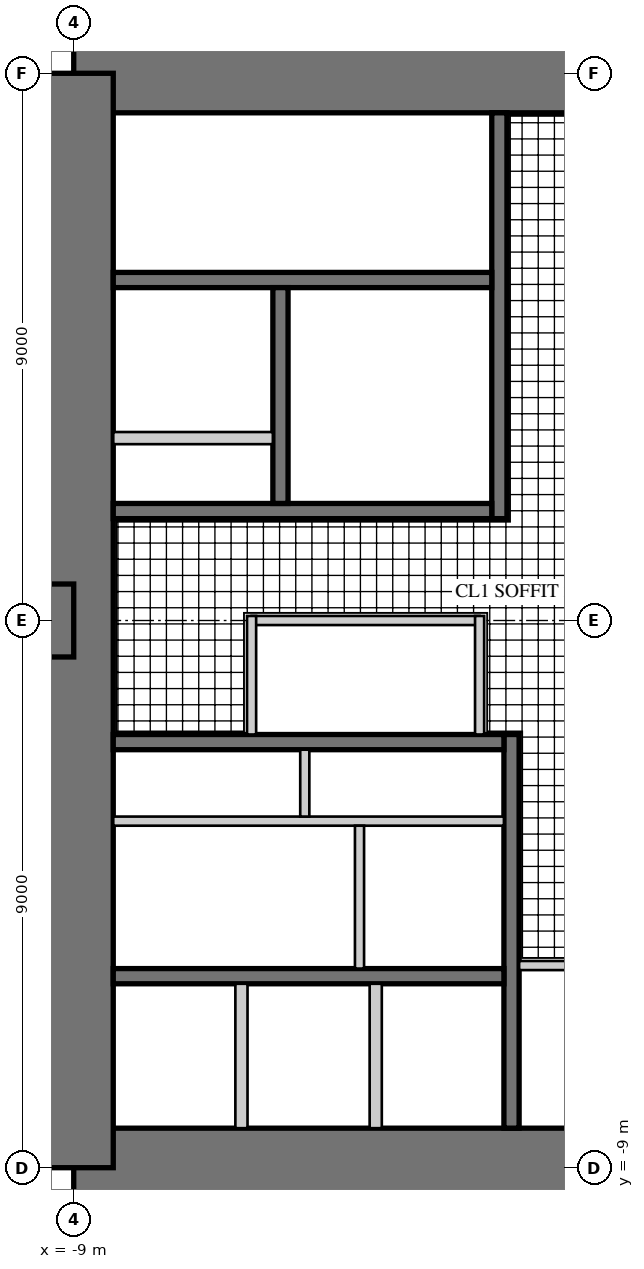
"""IFC4 building model, lengths in metres.
Left out: names, types, materials, properties, quantities, classifications, styles, units other than length and angle.
Written with IfcOpenShell. Run it as: python <this file> out.ifc"""

import sys

from ifc_helpers import new_model, si_unit, direction, frame, frame_2d, origin, place, context, subcontext, project, spatial, rectangle, extrude, element, fill, save


model = new_model("IFC4")
c1 = context("Model", 3, precision=1e-05, world=origin(), true_north=direction((0.0, 1.0)))
c2 = subcontext(c1, "Body", "Model", "MODEL_VIEW")
j1 = project(units=[si_unit("LENGTHUNIT", "METRE"), si_unit("PLANEANGLEUNIT", "RADIAN")], contexts=[c1])
p1 = place(None, origin())
s1 = spatial("IfcSite", under=j1, at=p1, CompositionType="ELEMENT")
p2 = place(p1, origin())
s2 = spatial("IfcBuilding", under=s1, at=p2, CompositionType="ELEMENT")
p3 = place(p2, frame((0.0, 0.0, 104.5)))
s3 = spatial("IfcBuildingStorey", under=s2, at=p3, CompositionType="ELEMENT", Elevation=104.5)
p4 = place(p3, frame((9.0, 9.0, 0.0), z_axis=(0.0, 0.0, 1.0), x_axis=(-1.0, 0.0, 0.0)))
e1 = element("IfcWall", 1, at=p4, inside=s3, PredefinedType="SHEAR", context=c2, shape_type="SweptSolid", body=[
    extrude(rectangle(XDim=18.0, YDim=1.3, at=frame_2d((9.0, 0.0))), origin(), (0.0, 0.0, 1.0), 4.0),
])
p5 = place(p4, frame((9.8, 0.0, 0.0)))
e2 = element("IfcOpeningElement", 2, at=p5, cuts=e1, PredefinedType="OPENING", context=c2, shape_type="SweptSolid", body=[
    extrude(rectangle(XDim=1.0, YDim=2.4, at=frame_2d((0.5, 1.2))), frame((0.0, 0.66, 0.0), z_axis=(0.0, -1.0, 0.0), x_axis=(1.0, 0.0, 0.0)), (0.0, 0.0, 1.0), 1.32),
])
p6 = place(p3, frame((-9.0, -9.0, 0.0), z_axis=(0.0, 0.0, 1.0), x_axis=(1.0, 0.0, 0.0)))
e3 = element("IfcWall", 3, at=p6, inside=s3, PredefinedType="SHEAR", context=c2, shape_type="SweptSolid", body=[
    extrude(rectangle(XDim=18.0, YDim=1.3, at=frame_2d((9.0, 0.0))), origin(), (0.0, 0.0, 1.0), 4.0),
])
p7 = place(p6, frame((9.8, 0.0, 0.0)))
e4 = element("IfcOpeningElement", 4, at=p7, cuts=e3, PredefinedType="OPENING", context=c2, shape_type="SweptSolid", body=[
    extrude(rectangle(XDim=1.0, YDim=2.4, at=frame_2d((0.5, 1.2))), frame((0.0, 0.66, 0.0), z_axis=(0.0, -1.0, 0.0), x_axis=(1.0, 0.0, 0.0)), (0.0, 0.0, 1.0), 1.32),
])
p8 = place(p3, frame((-9.0, 9.0, 0.0), z_axis=(0.0, 0.0, 1.0), x_axis=(0.0, -1.0, 0.0)))
e5 = element("IfcWall", 5, at=p8, inside=s3, PredefinedType="SHEAR", context=c2, shape_type="SweptSolid", body=[
    extrude(rectangle(XDim=18.0, YDim=1.3, at=frame_2d((9.0, 0.0))), origin(), (0.0, 0.0, 1.0), 4.0),
])
p9 = place(p8, frame((9.8, 0.0, 0.0)))
e6 = element("IfcOpeningElement", 6, at=p9, cuts=e5, PredefinedType="OPENING", context=c2, shape_type="SweptSolid", body=[
    extrude(rectangle(XDim=1.0, YDim=2.4, at=frame_2d((0.5, 1.2))), frame((0.0, 0.66, 0.0), z_axis=(0.0, -1.0, 0.0), x_axis=(1.0, 0.0, 0.0)), (0.0, 0.0, 1.0), 1.32),
])
p10 = place(p3, frame((-2.0, 1.675, 0.0), z_axis=(0.0, 0.0, 1.0), x_axis=(0.0, 1.0, 0.0)))
e7 = element("IfcWall", 7, at=p10, inside=s3, PredefinedType="SHEAR", context=c2, shape_type="SweptSolid", body=[
    extrude(rectangle(XDim=6.675, YDim=0.25, at=frame_2d((3.337, 0.0))), origin(), (0.0, 0.0, 1.0), 4.0),
])
p11 = place(p10, frame((0.725, 0.0, 0.0)))
e8 = element("IfcOpeningElement", 8, at=p11, cuts=e7, PredefinedType="OPENING", context=c2, shape_type="SweptSolid", body=[
    extrude(rectangle(XDim=1.0, YDim=2.1, at=frame_2d((0.5, 1.05))), frame((0.0, 0.135, 0.0), z_axis=(0.0, -1.0, 0.0), x_axis=(1.0, 0.0, 0.0)), (0.0, 0.0, 1.0), 0.27),
])
p12 = place(p3, frame((-2.125, 1.8, 0.0), z_axis=(0.0, 0.0, 1.0), x_axis=(-1.0, 0.0, 0.0)))
e9 = element("IfcWall", 9, at=p12, inside=s3, PredefinedType="SHEAR", context=c2, shape_type="SweptSolid", body=[
    extrude(rectangle(XDim=6.225, YDim=0.25, at=frame_2d((3.113, 0.0))), origin(), (0.0, 0.0, 1.0), 4.0),
])
p13 = place(p3, frame((-2.125, 5.6, 0.0), z_axis=(0.0, 0.0, 1.0), x_axis=(-1.0, 0.0, 0.0)))
e10 = element("IfcWall", 10, at=p13, inside=s3, PredefinedType="SHEAR", context=c2, shape_type="SweptSolid", body=[
    extrude(rectangle(XDim=6.225, YDim=0.25, at=frame_2d((3.113, 0.0))), origin(), (0.0, 0.0, 1.0), 4.0),
])
p14 = place(p13, frame((0.175, 0.0, 0.0)))
e11 = element("IfcOpeningElement", 11, at=p14, cuts=e10, PredefinedType="OPENING", context=c2, shape_type="SweptSolid", body=[
    extrude(rectangle(XDim=1.0, YDim=2.1, at=frame_2d((0.5, 1.05))), frame((0.0, 0.135, 0.0), z_axis=(0.0, -1.0, 0.0), x_axis=(1.0, 0.0, 0.0)), (0.0, 0.0, 1.0), 0.27),
])
p15 = place(p3, frame((-5.6, 1.925, 0.0), z_axis=(0.0, 0.0, 1.0), x_axis=(0.0, 1.0, 0.0)))
e12 = element("IfcWall", 12, at=p15, inside=s3, PredefinedType="SHEAR", context=c2, shape_type="SweptSolid", body=[
    extrude(rectangle(XDim=3.55, YDim=0.25, at=frame_2d((1.775, 0.0))), origin(), (0.0, 0.0, 1.0), 4.0),
])
p16 = place(p15, frame((1.525, 0.0, 0.0)))
e13 = element("IfcOpeningElement", 13, at=p16, cuts=e12, PredefinedType="OPENING", context=c2, shape_type="SweptSolid", body=[
    extrude(rectangle(XDim=1.1, YDim=2.2, at=frame_2d((0.55, 1.1))), frame((0.0, 0.135, 0.0), z_axis=(0.0, -1.0, 0.0), x_axis=(1.0, 0.0, 0.0)), (0.0, 0.0, 1.0), 0.27),
])
p17 = place(p15, frame((0.075, 0.0, 0.0)))
e14 = element("IfcOpeningElement", 14, at=p17, cuts=e12, PredefinedType="OPENING", context=c2, shape_type="SweptSolid", body=[
    extrude(rectangle(XDim=0.8, YDim=2.1, at=frame_2d((0.4, 1.05))), frame((0.0, 0.135, 0.0), z_axis=(0.0, -1.0, 0.0), x_axis=(1.0, 0.0, 0.0)), (0.0, 0.0, 1.0), 0.27),
])
p18 = place(p3, frame((-5.725, 3.0, 0.0), z_axis=(0.0, 0.0, 1.0), x_axis=(-1.0, 0.0, 0.0)))
e15 = element("IfcWall", 15, at=p18, inside=s3, PredefinedType="PARTITIONING", context=c2, shape_type="SweptSolid", body=[
    extrude(rectangle(XDim=2.625, YDim=0.2, at=frame_2d((1.312, 0.0))), origin(), (0.0, 0.0, 1.0), 4.0),
])
p19 = place(p3, frame((-1.8, -1.875, 0.0), z_axis=(0.0, 0.0, 1.0), x_axis=(0.0, -1.0, 0.0)))
e16 = element("IfcWall", 16, at=p19, inside=s3, PredefinedType="SHEAR", context=c2, shape_type="SweptSolid", body=[
    extrude(rectangle(XDim=6.475, YDim=0.25, at=frame_2d((3.238, 0.0))), origin(), (0.0, 0.0, 1.0), 4.0),
])
p20 = place(p19, frame((1.875, 0.0, 0.0)))
e17 = element("IfcOpeningElement", 17, at=p20, cuts=e16, PredefinedType="OPENING", context=c2, shape_type="SweptSolid", body=[
    extrude(rectangle(XDim=1.6, YDim=2.4, at=frame_2d((0.8, 1.2))), frame((0.0, 0.135, 0.0), z_axis=(0.0, -1.0, 0.0), x_axis=(1.0, 0.0, 0.0)), (0.0, 0.0, 1.0), 0.27),
])
for number, where, z_axis, x_axis in (
    (18, (-1.925, -2.0, 0.0), (0.0, 0.0, 1.0), (-1.0, 0.0, 0.0)),
    (19, (-1.925, -5.85, 0.0), (0.0, 0.0, 1.0), (-1.0, 0.0, 0.0)),
):
    element("IfcWall", number, at=place(p3, frame(where, z_axis=z_axis, x_axis=x_axis)), inside=s3, PredefinedType="SHEAR", context=c2, shape_type="SweptSolid", body=[
        extrude(rectangle(XDim=6.425, YDim=0.25, at=frame_2d((3.212, 0.0))), origin(), (0.0, 0.0, 1.0), 4.0),
    ])
p21 = place(p3, frame((-1.925, -3.3, 0.0), z_axis=(0.0, 0.0, 1.0), x_axis=(-1.0, 0.0, 0.0)))
e20 = element("IfcWall", 20, at=p21, inside=s3, PredefinedType="PARTITIONING", context=c2, shape_type="SweptSolid", body=[
    extrude(rectangle(XDim=6.425, YDim=0.15, at=frame_2d((3.212, 0.0))), origin(), (0.0, 0.0, 1.0), 4.0),
])
p22 = place(p21, frame((0.075, 0.0, 0.0)))
e21 = element("IfcOpeningElement", 21, at=p22, cuts=e20, PredefinedType="OPENING", context=c2, shape_type="SweptSolid", body=[
    extrude(rectangle(XDim=0.8, YDim=2.1, at=frame_2d((0.4, 1.05))), frame((0.0, 0.085, 0.0), z_axis=(0.0, -1.0, 0.0), x_axis=(1.0, 0.0, 0.0)), (0.0, 0.0, 1.0), 0.17),
])
p23 = place(p21, frame((3.675, 0.0, 0.0)))
e22 = element("IfcOpeningElement", 22, at=p23, cuts=e20, PredefinedType="OPENING", context=c2, shape_type="SweptSolid", body=[
    extrude(rectangle(XDim=0.8, YDim=2.1, at=frame_2d((0.4, 1.05))), frame((0.0, 0.085, 0.0), z_axis=(0.0, -1.0, 0.0), x_axis=(1.0, 0.0, 0.0)), (0.0, 0.0, 1.0), 0.17),
])
p24 = place(p3, frame((-5.2, -2.125, 0.0), z_axis=(0.0, 0.0, 1.0), x_axis=(0.0, -1.0, 0.0)))
e23 = element("IfcWall", 23, at=p24, inside=s3, PredefinedType="PARTITIONING", context=c2, shape_type="SweptSolid", body=[
    extrude(rectangle(XDim=1.1, YDim=0.15, at=frame_2d((0.55, 0.0))), origin(), (0.0, 0.0, 1.0), 4.0),
])
for number, where, z_axis, x_axis in (
    (24, (-4.033, -5.975, 0.0), (0.0, 0.0, 1.0), (0.0, -1.0, 0.0)),
    (25, (-6.242, -5.975, 0.0), (0.0, 0.0, 1.0), (0.0, -1.0, 0.0)),
):
    element("IfcWall", number, at=place(p3, frame(where, z_axis=z_axis, x_axis=x_axis)), inside=s3, PredefinedType="PARTITIONING", context=c2, shape_type="SweptSolid", body=[
        extrude(rectangle(XDim=2.375, YDim=0.2, at=frame_2d((1.188, 0.0))), origin(), (0.0, 0.0, 1.0), 4.0),
    ])
p25 = place(p3, frame((-9.0, 0.0, 0.0), z_axis=(0.0, 0.0, 1.0), x_axis=(-1.0, 0.0, 0.0)))
e26 = element("IfcWall", 26, at=p25, inside=s3, PredefinedType="SHEAR", context=c2, shape_type="SweptSolid", body=[
    extrude(rectangle(XDim=18.0, YDim=1.2, at=frame_2d((9.0, 0.0))), origin(), (0.0, 0.0, 1.0), 4.0),
])
p26 = place(p25, frame((9.8, 0.0, 0.0)))
e27 = element("IfcOpeningElement", 27, at=p26, cuts=e26, PredefinedType="OPENING", context=c2, shape_type="SweptSolid", body=[
    extrude(rectangle(XDim=1.0, YDim=2.2, at=frame_2d((0.5, 1.1))), frame((0.0, 0.61, 0.0), z_axis=(0.0, -1.0, 0.0), x_axis=(1.0, 0.0, 0.0)), (0.0, 0.0, 1.0), 1.22),
])
p27 = place(p3, frame((-2.325, 0.0, 0.0), z_axis=(0.0, 0.0, 1.0), x_axis=(-1.0, 0.0, 0.0)))
e28 = element("IfcWall", 28, at=p27, inside=s3, PredefinedType="PARTITIONING", context=c2, shape_type="SweptSolid", body=[
    extrude(rectangle(XDim=3.75, YDim=0.15, at=frame_2d((1.875, 0.0))), origin(), (0.0, 0.0, 1.0), 3.8),
])
p28 = place(p27, frame((0.4, 0.0, 0.0)))
e29 = element("IfcOpeningElement", 29, at=p28, cuts=e28, PredefinedType="OPENING", context=c2, shape_type="SweptSolid", body=[
    extrude(rectangle(XDim=1.0, YDim=2.1, at=frame_2d((0.5, 1.05))), frame((0.0, 0.085, 0.0), z_axis=(0.0, -1.0, 0.0), x_axis=(1.0, 0.0, 0.0)), (0.0, 0.0, 1.0), 0.17),
])
for number, where, z_axis, x_axis in (
    (30, (-2.325, -1.875, 0.0), (0.0, 0.0, 1.0), (0.0, 1.0, 0.0)),
    (31, (-6.075, 0.075, 0.0), (0.0, 0.0, 1.0), (0.0, -1.0, 0.0)),
):
    element("IfcWall", number, at=place(p3, frame(where, z_axis=z_axis, x_axis=x_axis)), inside=s3, PredefinedType="PARTITIONING", context=c2, shape_type="SweptSolid", body=[
        extrude(rectangle(XDim=1.95, YDim=0.15, at=frame_2d((0.975, 0.0))), origin(), (0.0, 0.0, 1.0), 3.8),
    ])
p29 = place(p3, frame((-1.675, -5.675, 0.0), z_axis=(0.0, 0.0, 1.0), x_axis=(1.0, 0.0, 0.0)))
e32 = element("IfcWall", 32, at=p29, inside=s3, PredefinedType="PARTITIONING", context=c2, shape_type="SweptSolid", body=[
    extrude(rectangle(XDim=1.75, YDim=0.15, at=frame_2d((0.875, 0.0))), origin(), (0.0, 0.0, 1.0), 3.8),
])
p30 = place(p3, frame((-4.3, -3.375, 0.0), z_axis=(0.0, 0.0, 1.0), x_axis=(0.0, -1.0, 0.0)))
e33 = element("IfcWall", 33, at=p30, inside=s3, PredefinedType="PARTITIONING", context=c2, shape_type="SweptSolid", body=[
    extrude(rectangle(XDim=2.35, YDim=0.15, at=frame_2d((1.175, 0.0))), origin(), (0.0, 0.0, 1.0), 3.8),
])
p31 = place(p30, frame((0.45, 0.0, 0.0)))
e34 = element("IfcOpeningElement", 34, at=p31, cuts=e33, PredefinedType="OPENING", context=c2, shape_type="SweptSolid", body=[
    extrude(rectangle(XDim=1.0, YDim=2.1, at=frame_2d((0.5, 1.05))), frame((0.0, 0.085, 0.0), z_axis=(0.0, -1.0, 0.0), x_axis=(1.0, 0.0, 0.0)), (0.0, 0.0, 1.0), 0.17),
])
p32 = place(p28, origin())
e35 = element("IfcDoor", 35, at=p32, inside=s3, OperationType="SINGLE_SWING_LEFT", PredefinedType="DOOR", context=c2, shape_type="SweptSolid", body=[
    extrude(rectangle(XDim=1.0, YDim=2.1, at=frame_2d((0.5, 1.05))), frame((0.0, 0.025, 0.0), z_axis=(0.0, -1.0, 0.0), x_axis=(1.0, 0.0, 0.0)), (0.0, 0.0, 1.0), 0.05),
])
fill(e29, e35)
p33 = place(p31, origin())
e36 = element("IfcDoor", 36, at=p33, inside=s3, OperationType="SINGLE_SWING_LEFT", PredefinedType="DOOR", context=c2, shape_type="SweptSolid", body=[
    extrude(rectangle(XDim=1.0, YDim=2.1, at=frame_2d((0.5, 1.05))), frame((0.0, 0.025, 0.0), z_axis=(0.0, -1.0, 0.0), x_axis=(1.0, 0.0, 0.0)), (0.0, 0.0, 1.0), 0.05),
])
fill(e34, e36)
p34 = place(p5, frame((1.0, 0.0, 0.0), z_axis=(0.0, 0.0, 1.0), x_axis=(-1.0, 0.0, 0.0)))
e37 = element("IfcDoor", 37, at=p34, inside=s3, OperationType="SINGLE_SWING_RIGHT", PredefinedType="DOOR", context=c2, shape_type="SweptSolid", body=[
    extrude(rectangle(XDim=1.0, YDim=2.4, at=frame_2d((0.5, 1.2))), frame((0.0, -0.005, 0.0), z_axis=(0.0, -1.0, 0.0), x_axis=(1.0, 0.0, 0.0)), (0.0, 0.0, 1.0), 0.05),
])
fill(e2, e37)
p35 = place(p9, frame((1.0, 0.0, 0.0), z_axis=(0.0, 0.0, 1.0), x_axis=(-1.0, 0.0, 0.0)))
e38 = element("IfcDoor", 38, at=p35, inside=s3, OperationType="SINGLE_SWING_RIGHT", PredefinedType="DOOR", context=c2, shape_type="SweptSolid", body=[
    extrude(rectangle(XDim=1.0, YDim=2.4, at=frame_2d((0.5, 1.2))), frame((0.0, -0.005, 0.0), z_axis=(0.0, -1.0, 0.0), x_axis=(1.0, 0.0, 0.0)), (0.0, 0.0, 1.0), 0.05),
])
fill(e6, e38)
p36 = place(p11, origin())
e39 = element("IfcDoor", 39, at=p36, inside=s3, OperationType="SINGLE_SWING_LEFT", PredefinedType="DOOR", context=c2, shape_type="SweptSolid", body=[
    extrude(rectangle(XDim=1.0, YDim=2.1, at=frame_2d((0.5, 1.05))), frame((0.0, 0.025, 0.0), z_axis=(0.0, -1.0, 0.0), x_axis=(1.0, 0.0, 0.0)), (0.0, 0.0, 1.0), 0.05),
])
fill(e8, e39)
p37 = place(p14, frame((1.0, 0.0, 0.0), z_axis=(0.0, 0.0, 1.0), x_axis=(-1.0, 0.0, 0.0)))
e40 = element("IfcDoor", 40, at=p37, inside=s3, OperationType="SINGLE_SWING_RIGHT", PredefinedType="DOOR", context=c2, shape_type="SweptSolid", body=[
    extrude(rectangle(XDim=1.0, YDim=2.1, at=frame_2d((0.5, 1.05))), frame((0.0, 0.025, 0.0), z_axis=(0.0, -1.0, 0.0), x_axis=(1.0, 0.0, 0.0)), (0.0, 0.0, 1.0), 0.05),
])
fill(e11, e40)
p38 = place(p16, origin())
e41 = element("IfcDoor", 41, at=p38, inside=s3, OperationType="DOUBLE_DOOR_SLIDING", PredefinedType="DOOR", context=c2, shape_type="SweptSolid", body=[
    extrude(rectangle(XDim=1.1, YDim=2.2, at=frame_2d((0.55, 1.1))), frame((0.0, 0.025, 0.0), z_axis=(0.0, -1.0, 0.0), x_axis=(1.0, 0.0, 0.0)), (0.0, 0.0, 1.0), 0.05),
])
fill(e13, e41)
p39 = place(p17, origin())
e42 = element("IfcDoor", 42, at=p39, inside=s3, OperationType="SINGLE_SWING_LEFT", PredefinedType="DOOR", context=c2, shape_type="SweptSolid", body=[
    extrude(rectangle(XDim=0.8, YDim=2.1, at=frame_2d((0.4, 1.05))), frame((0.0, 0.025, 0.0), z_axis=(0.0, -1.0, 0.0), x_axis=(1.0, 0.0, 0.0)), (0.0, 0.0, 1.0), 0.05),
])
fill(e14, e42)
p40 = place(p20, frame((1.6, 0.0, 0.0), z_axis=(0.0, 0.0, 1.0), x_axis=(-1.0, 0.0, 0.0)))
e43 = element("IfcDoor", 43, at=p40, inside=s3, OperationType="DOUBLE_DOOR_SINGLE_SWING", PredefinedType="DOOR", context=c2, shape_type="SweptSolid", body=[
    extrude(rectangle(XDim=1.6, YDim=2.4, at=frame_2d((0.8, 1.2))), frame((0.0, 0.025, 0.0), z_axis=(0.0, -1.0, 0.0), x_axis=(1.0, 0.0, 0.0)), (0.0, 0.0, 1.0), 0.05),
])
fill(e17, e43)
p41 = place(p22, frame((0.8, 0.0, 0.0), z_axis=(0.0, 0.0, 1.0), x_axis=(-1.0, 0.0, 0.0)))
e44 = element("IfcDoor", 44, at=p41, inside=s3, OperationType="SINGLE_SWING_RIGHT", PredefinedType="DOOR", context=c2, shape_type="SweptSolid", body=[
    extrude(rectangle(XDim=0.8, YDim=2.1, at=frame_2d((0.4, 1.05))), frame((0.0, 0.025, 0.0), z_axis=(0.0, -1.0, 0.0), x_axis=(1.0, 0.0, 0.0)), (0.0, 0.0, 1.0), 0.05),
])
fill(e21, e44)
p42 = place(p23, frame((0.8, 0.0, 0.0), z_axis=(0.0, 0.0, 1.0), x_axis=(-1.0, 0.0, 0.0)))
e45 = element("IfcDoor", 45, at=p42, inside=s3, OperationType="SINGLE_SWING_RIGHT", PredefinedType="DOOR", context=c2, shape_type="SweptSolid", body=[
    extrude(rectangle(XDim=0.8, YDim=2.1, at=frame_2d((0.4, 1.05))), frame((0.0, 0.025, 0.0), z_axis=(0.0, -1.0, 0.0), x_axis=(1.0, 0.0, 0.0)), (0.0, 0.0, 1.0), 0.05),
])
fill(e22, e45)
save(model, sys.argv[1])
